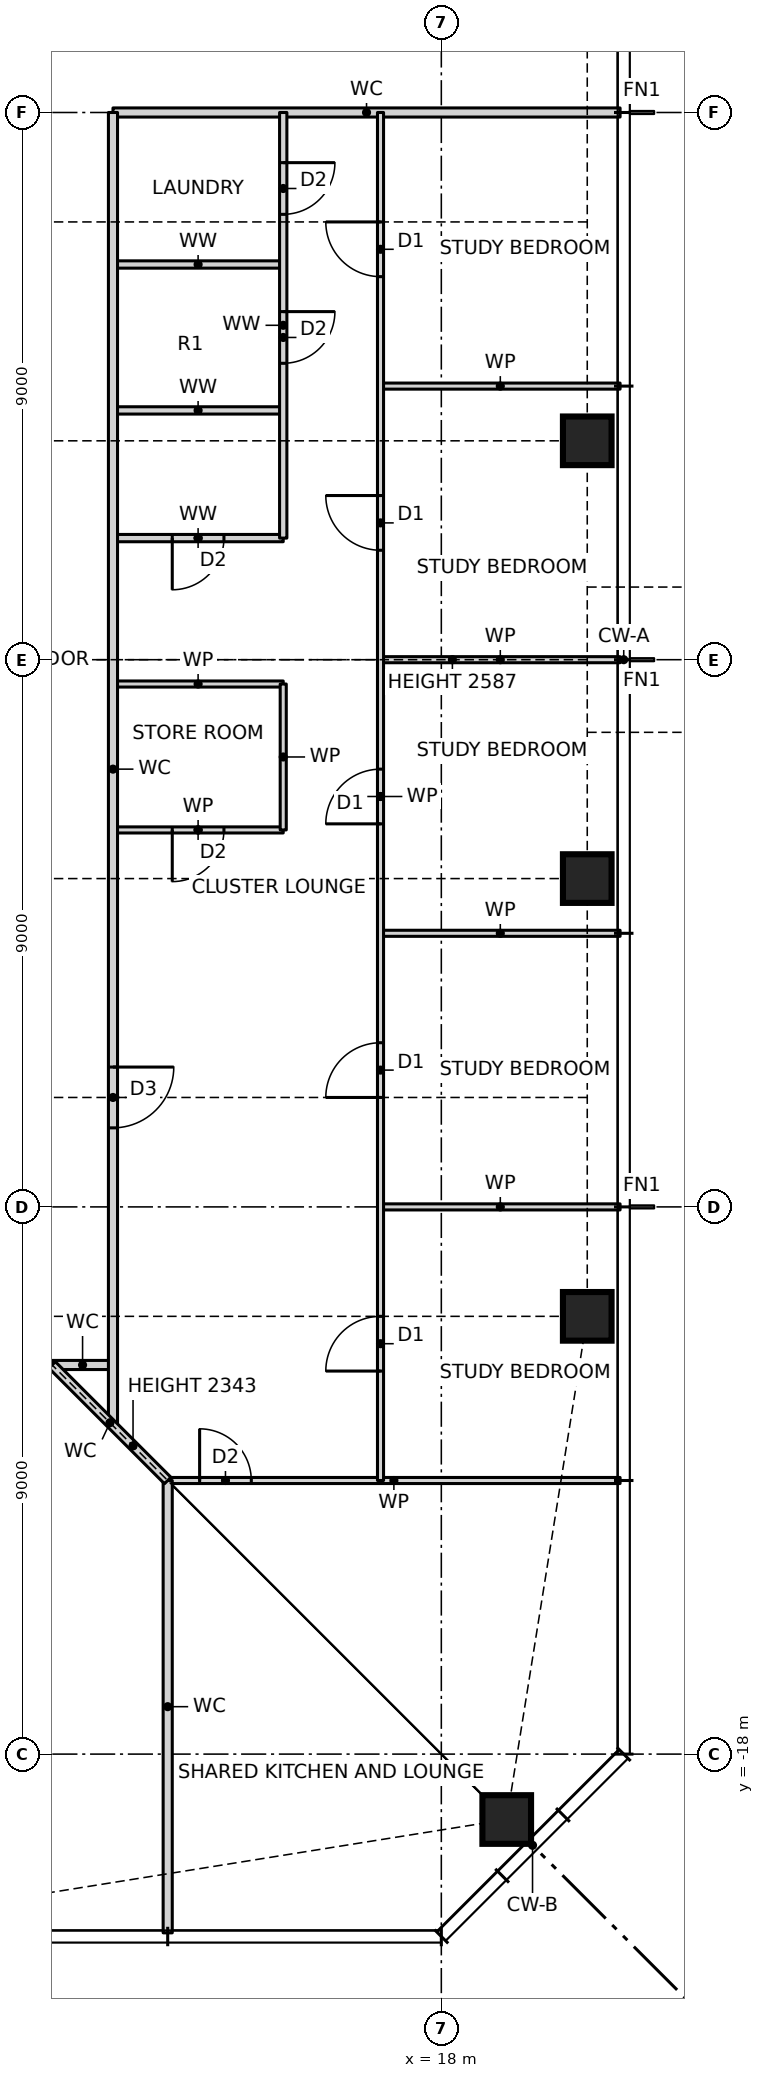
"""IFC4 building model, lengths in metres.
Left out: names, types, materials, properties, quantities, classifications, styles, units other than length and angle.
Written with IfcOpenShell. Run it as: python <this file> out.ifc"""

import sys

from ifc_helpers import new_model, si_unit, direction, frame, frame_2d, origin, origin_2d, place, context, subcontext, project, spatial, rectangle, hollow_rectangle, extrude, element, fill, save


model = new_model("IFC4")
c1 = context("Model", 3, precision=1e-05, world=origin(), true_north=direction((0.0, 1.0)))
c2 = subcontext(c1, "Body", "Model", "MODEL_VIEW")
j1 = project(units=[si_unit("LENGTHUNIT", "METRE"), si_unit("PLANEANGLEUNIT", "RADIAN")], contexts=[c1])
p1 = place(None, origin())
s1 = spatial("IfcSite", under=j1, at=p1, CompositionType="ELEMENT")
p2 = place(p1, origin())
s2 = spatial("IfcBuilding", under=s1, at=p2, CompositionType="ELEMENT")
p3 = place(p2, frame((0.0, 0.0, 94.5)))
s3 = spatial("IfcBuildingStorey", under=s2, at=p3, CompositionType="ELEMENT", Elevation=94.5)
for number, where, z_axis, x_axis in (
    (1, (19.076, -19.076, 0.0), (0.0, 0.0, 1.0), (1.0, 0.0, 0.0)),
    (2, (20.4, -10.8, 0.0), (0.0, 0.0, 1.0), (1.0, 0.0, 0.0)),
    (3, (20.4, -3.6, 0.0), (0.0, 0.0, 1.0), (1.0, 0.0, 0.0)),
    (4, (20.4, 3.6, 0.0), (0.0, 0.0, 1.0), (1.0, 0.0, 0.0)),
):
    element("IfcColumn", number, at=place(p3, frame(where, z_axis=z_axis, x_axis=x_axis)), inside=s3, PredefinedType="COLUMN", context=c2, shape_type="SweptSolid", body=[
        extrude(hollow_rectangle(XDim=0.8, YDim=0.8, WallThickness=0.07, at=origin_2d()), origin(), (0.0, 0.0, 1.0), 3.5),
    ])
p4 = place(p3, frame((13.5, -13.5, 0.0), z_axis=(0.0, 0.0, 1.0), x_axis=(1.0, 0.0, 0.0)))
e5 = element("IfcWall", 5, at=p4, inside=s3, PredefinedType="PARTITIONING", context=c2, shape_type="SweptSolid", body=[
    extrude(rectangle(XDim=7.44, YDim=0.1, at=frame_2d((3.72, 0.0))), origin(), (0.0, 0.0, 1.0), 3.27),
])
p5 = place(p4, frame((0.525, 0.0, 0.0)))
e6 = element("IfcOpeningElement", 6, at=p5, cuts=e5, PredefinedType="OPENING", context=c2, shape_type="SweptSolid", body=[
    extrude(rectangle(XDim=0.85, YDim=2.1, at=frame_2d((0.425, 1.05))), frame((0.0, 0.06, 0.0), z_axis=(0.0, -1.0, 0.0), x_axis=(1.0, 0.0, 0.0)), (0.0, 0.0, 1.0), 0.12),
])
p6 = place(p3, frame((11.6, -11.6, 0.0), z_axis=(0.0, 0.0, 1.0), x_axis=(1.0, 0.0, 0.0)))
e7 = element("IfcWall", 7, at=p6, inside=s3, PredefinedType="PARTITIONING", context=c2, shape_type="SweptSolid", body=[
    extrude(rectangle(XDim=1.0, YDim=0.15, at=frame_2d((0.5, 0.0))), origin(), (0.0, 0.0, 1.0), 3.27),
])
for number, where, z_axis, x_axis in (
    (8, (17.0, -9.0, 0.0), (0.0, 0.0, 1.0), (1.0, 0.0, 0.0)),
    (9, (17.0, -4.5, 0.0), (0.0, 0.0, 1.0), (1.0, 0.0, 0.0)),
):
    element("IfcWall", number, at=place(p3, frame(where, z_axis=z_axis, x_axis=x_axis)), inside=s3, PredefinedType="PARTITIONING", context=c2, shape_type="SweptSolid", body=[
        extrude(rectangle(XDim=3.94, YDim=0.1, at=frame_2d((1.97, 0.0))), origin(), (0.0, 0.0, 1.0), 3.27),
    ])
p7 = place(p3, frame((12.6, -2.8, 0.0), z_axis=(0.0, 0.0, 1.0), x_axis=(1.0, 0.0, 0.0)))
e10 = element("IfcWall", 10, at=p7, inside=s3, PredefinedType="PARTITIONING", context=c2, shape_type="SweptSolid", body=[
    extrude(rectangle(XDim=2.8, YDim=0.1, at=frame_2d((1.4, 0.0))), origin(), (0.0, 0.0, 1.0), 3.27),
])
p8 = place(p7, frame((0.975, 0.0, 0.0)))
e11 = element("IfcOpeningElement", 11, at=p8, cuts=e10, PredefinedType="OPENING", context=c2, shape_type="SweptSolid", body=[
    extrude(rectangle(XDim=0.85, YDim=2.1, at=frame_2d((0.425, 1.05))), frame((0.0, 0.06, 0.0), z_axis=(0.0, -1.0, 0.0), x_axis=(1.0, 0.0, 0.0)), (0.0, 0.0, 1.0), 0.12),
])
p9 = place(p3, frame((12.6, -0.4, 0.0), z_axis=(0.0, 0.0, 1.0), x_axis=(1.0, 0.0, 0.0)))
e12 = element("IfcWall", 12, at=p9, inside=s3, PredefinedType="PARTITIONING", context=c2, shape_type="SweptSolid", body=[
    extrude(rectangle(XDim=2.8, YDim=0.1, at=frame_2d((1.4, 0.0))), origin(), (0.0, 0.0, 1.0), 3.27),
])
p10 = place(p3, frame((17.0, 0.0, 0.0), z_axis=(0.0, 0.0, 1.0), x_axis=(1.0, 0.0, 0.0)))
e13 = element("IfcWall", 13, at=p10, inside=s3, PredefinedType="PARTITIONING", context=c2, shape_type="SweptSolid", body=[
    extrude(rectangle(XDim=3.94, YDim=0.1, at=frame_2d((1.97, 0.0))), origin(), (0.0, 0.0, 1.0), 2.587),
])
p11 = place(p3, frame((12.6, 2.0, 0.0), z_axis=(0.0, 0.0, 1.0), x_axis=(1.0, 0.0, 0.0)))
e14 = element("IfcWall", 14, at=p11, inside=s3, PredefinedType="PARTITIONING", context=c2, shape_type="SweptSolid", body=[
    extrude(rectangle(XDim=2.8, YDim=0.12, at=frame_2d((1.4, 0.0))), origin(), (0.0, 0.0, 1.0), 3.27),
])
p12 = place(p11, frame((0.975, 0.0, 0.0)))
e15 = element("IfcOpeningElement", 15, at=p12, cuts=e14, PredefinedType="OPENING", context=c2, shape_type="SweptSolid", body=[
    extrude(rectangle(XDim=0.85, YDim=2.1, at=frame_2d((0.425, 1.05))), frame((0.0, 0.07, 0.0), z_axis=(0.0, -1.0, 0.0), x_axis=(1.0, 0.0, 0.0)), (0.0, 0.0, 1.0), 0.14),
])
p13 = place(p3, frame((12.6, 4.1, 0.0), z_axis=(0.0, 0.0, 1.0), x_axis=(1.0, 0.0, 0.0)))
e16 = element("IfcWall", 16, at=p13, inside=s3, PredefinedType="PARTITIONING", context=c2, shape_type="SweptSolid", body=[
    extrude(rectangle(XDim=2.8, YDim=0.12, at=frame_2d((1.4, 0.0))), origin(), (0.0, 0.0, 1.0), 3.27),
])
p14 = place(p3, frame((17.0, 4.5, 0.0), z_axis=(0.0, 0.0, 1.0), x_axis=(1.0, 0.0, 0.0)))
e17 = element("IfcWall", 17, at=p14, inside=s3, PredefinedType="PARTITIONING", context=c2, shape_type="SweptSolid", body=[
    extrude(rectangle(XDim=3.94, YDim=0.1, at=frame_2d((1.97, 0.0))), origin(), (0.0, 0.0, 1.0), 3.27),
])
p15 = place(p3, frame((12.6, 6.5, 0.0), z_axis=(0.0, 0.0, 1.0), x_axis=(1.0, 0.0, 0.0)))
e18 = element("IfcWall", 18, at=p15, inside=s3, PredefinedType="PARTITIONING", context=c2, shape_type="SweptSolid", body=[
    extrude(rectangle(XDim=2.8, YDim=0.12, at=frame_2d((1.4, 0.0))), origin(), (0.0, 0.0, 1.0), 3.27),
])
p16 = place(p3, frame((12.6, 9.0, 0.0), z_axis=(0.0, 0.0, 1.0), x_axis=(1.0, 0.0, 0.0)))
e19 = element("IfcWall", 19, at=p16, inside=s3, PredefinedType="PARTITIONING", context=c2, shape_type="SweptSolid", body=[
    extrude(rectangle(XDim=8.34, YDim=0.15, at=frame_2d((4.17, 0.0))), origin(), (0.0, 0.0, 1.0), 3.27),
])
p17 = place(p3, frame((17.0, -13.5, 0.0), z_axis=(0.0, 0.0, 1.0), x_axis=(0.0, 1.0, 0.0)))
e20 = element("IfcWall", 20, at=p17, inside=s3, PredefinedType="PARTITIONING", context=c2, shape_type="SweptSolid", body=[
    extrude(rectangle(XDim=22.5, YDim=0.1, at=frame_2d((11.25, 0.0))), origin(), (0.0, 0.0, 1.0), 3.27),
])
p18 = place(p17, frame((1.8, 0.0, 0.0)))
e21 = element("IfcOpeningElement", 21, at=p18, cuts=e20, PredefinedType="OPENING", context=c2, shape_type="SweptSolid", body=[
    extrude(rectangle(XDim=0.9, YDim=2.1, at=frame_2d((0.45, 1.05))), frame((0.0, 0.06, 0.0), z_axis=(0.0, -1.0, 0.0), x_axis=(1.0, 0.0, 0.0)), (0.0, 0.0, 1.0), 0.12),
])
p19 = place(p17, frame((6.3, 0.0, 0.0)))
e22 = element("IfcOpeningElement", 22, at=p19, cuts=e20, PredefinedType="OPENING", context=c2, shape_type="SweptSolid", body=[
    extrude(rectangle(XDim=0.9, YDim=2.1, at=frame_2d((0.45, 1.05))), frame((0.0, 0.06, 0.0), z_axis=(0.0, -1.0, 0.0), x_axis=(1.0, 0.0, 0.0)), (0.0, 0.0, 1.0), 0.12),
])
p20 = place(p17, frame((10.8, 0.0, 0.0)))
e23 = element("IfcOpeningElement", 23, at=p20, cuts=e20, PredefinedType="OPENING", context=c2, shape_type="SweptSolid", body=[
    extrude(rectangle(XDim=0.9, YDim=2.1, at=frame_2d((0.45, 1.05))), frame((0.0, 0.06, 0.0), z_axis=(0.0, -1.0, 0.0), x_axis=(1.0, 0.0, 0.0)), (0.0, 0.0, 1.0), 0.12),
])
p21 = place(p17, frame((15.3, 0.0, 0.0)))
e24 = element("IfcOpeningElement", 24, at=p21, cuts=e20, PredefinedType="OPENING", context=c2, shape_type="SweptSolid", body=[
    extrude(rectangle(XDim=0.9, YDim=2.1, at=frame_2d((0.45, 1.05))), frame((0.0, 0.06, 0.0), z_axis=(0.0, -1.0, 0.0), x_axis=(1.0, 0.0, 0.0)), (0.0, 0.0, 1.0), 0.12),
])
p22 = place(p17, frame((19.8, 0.0, 0.0)))
e25 = element("IfcOpeningElement", 25, at=p22, cuts=e20, PredefinedType="OPENING", context=c2, shape_type="SweptSolid", body=[
    extrude(rectangle(XDim=0.9, YDim=2.1, at=frame_2d((0.45, 1.05))), frame((0.0, 0.06, 0.0), z_axis=(0.0, -1.0, 0.0), x_axis=(1.0, 0.0, 0.0)), (0.0, 0.0, 1.0), 0.12),
])
p23 = place(p3, frame((15.4, -2.8, 0.0), z_axis=(0.0, 0.0, 1.0), x_axis=(0.0, 1.0, 0.0)))
e26 = element("IfcWall", 26, at=p23, inside=s3, PredefinedType="PARTITIONING", context=c2, shape_type="SweptSolid", body=[
    extrude(rectangle(XDim=2.4, YDim=0.1, at=frame_2d((1.2, 0.0))), origin(), (0.0, 0.0, 1.0), 3.27),
])
p24 = place(p3, frame((15.4, 2.0, 0.0), z_axis=(0.0, 0.0, 1.0), x_axis=(0.0, 1.0, 0.0)))
e27 = element("IfcWall", 27, at=p24, inside=s3, PredefinedType="PARTITIONING", context=c2, shape_type="SweptSolid", body=[
    extrude(rectangle(XDim=7.0, YDim=0.12, at=frame_2d((3.5, 0.0))), origin(), (0.0, 0.0, 1.0), 3.27),
])
p25 = place(p24, frame((2.875, 0.0, 0.0)))
e28 = element("IfcOpeningElement", 28, at=p25, cuts=e27, PredefinedType="OPENING", context=c2, shape_type="SweptSolid", body=[
    extrude(rectangle(XDim=0.85, YDim=2.1, at=frame_2d((0.425, 1.05))), frame((0.0, 0.07, 0.0), z_axis=(0.0, -1.0, 0.0), x_axis=(1.0, 0.0, 0.0)), (0.0, 0.0, 1.0), 0.14),
])
p26 = place(p24, frame((5.325, 0.0, 0.0)))
e29 = element("IfcOpeningElement", 29, at=p26, cuts=e27, PredefinedType="OPENING", context=c2, shape_type="SweptSolid", body=[
    extrude(rectangle(XDim=0.85, YDim=2.1, at=frame_2d((0.425, 1.05))), frame((0.0, 0.07, 0.0), z_axis=(0.0, -1.0, 0.0), x_axis=(1.0, 0.0, 0.0)), (0.0, 0.0, 1.0), 0.14),
])
p27 = place(p3, frame((13.5, -20.94, 0.0), z_axis=(0.0, 0.0, 1.0), x_axis=(0.0, 1.0, 0.0)))
e30 = element("IfcWall", 30, at=p27, inside=s3, PredefinedType="PARTITIONING", context=c2, shape_type="SweptSolid", body=[
    extrude(rectangle(XDim=7.44, YDim=0.15, at=frame_2d((3.72, 0.0))), origin(), (0.0, 0.0, 1.0), 3.27),
])
p28 = place(p3, frame((12.6, -12.6, 0.0), z_axis=(0.0, 0.0, 1.0), x_axis=(0.0, 1.0, 0.0)))
e31 = element("IfcWall", 31, at=p28, inside=s3, PredefinedType="PARTITIONING", context=c2, shape_type="SweptSolid", body=[
    extrude(rectangle(XDim=21.6, YDim=0.15, at=frame_2d((10.8, 0.0))), origin(), (0.0, 0.0, 1.0), 3.27),
])
p29 = place(p28, frame((4.9, 0.0, 0.0)))
e32 = element("IfcOpeningElement", 32, at=p29, cuts=e31, PredefinedType="OPENING", context=c2, shape_type="SweptSolid", body=[
    extrude(rectangle(XDim=1.0, YDim=2.1, at=frame_2d((0.5, 1.05))), frame((0.0, 0.085, 0.0), z_axis=(0.0, -1.0, 0.0), x_axis=(1.0, 0.0, 0.0)), (0.0, 0.0, 1.0), 0.17),
])
p30 = place(p3, frame((13.5, -13.5, 0.0), z_axis=(0.0, 0.0, 1.0), x_axis=(-0.707106781187, 0.707106781187, 0.0)))
e33 = element("IfcWall", 33, at=p30, inside=s3, PredefinedType="PARTITIONING", context=c2, shape_type="SweptSolid", body=[
    extrude(rectangle(XDim=2.687, YDim=0.15, at=frame_2d((1.343, 0.0))), origin(), (0.0, 0.0, 1.0), 2.343),
])
p31 = place(p18, origin())
e34 = element("IfcDoor", 34, at=p31, inside=s3, OperationType="SINGLE_SWING_LEFT", PredefinedType="DOOR", context=c2, shape_type="SweptSolid", body=[
    extrude(rectangle(XDim=0.9, YDim=2.1, at=frame_2d((0.45, 1.05))), frame((0.0, 0.025, 0.0), z_axis=(0.0, -1.0, 0.0), x_axis=(1.0, 0.0, 0.0)), (0.0, 0.0, 1.0), 0.05),
])
fill(e21, e34)
p32 = place(p19, origin())
e35 = element("IfcDoor", 35, at=p32, inside=s3, OperationType="SINGLE_SWING_LEFT", PredefinedType="DOOR", context=c2, shape_type="SweptSolid", body=[
    extrude(rectangle(XDim=0.9, YDim=2.1, at=frame_2d((0.45, 1.05))), frame((0.0, 0.025, 0.0), z_axis=(0.0, -1.0, 0.0), x_axis=(1.0, 0.0, 0.0)), (0.0, 0.0, 1.0), 0.05),
])
fill(e22, e35)
p33 = place(p20, origin())
e36 = element("IfcDoor", 36, at=p33, inside=s3, OperationType="SINGLE_SWING_LEFT", PredefinedType="DOOR", context=c2, shape_type="SweptSolid", body=[
    extrude(rectangle(XDim=0.9, YDim=2.1, at=frame_2d((0.45, 1.05))), frame((0.0, 0.025, 0.0), z_axis=(0.0, -1.0, 0.0), x_axis=(1.0, 0.0, 0.0)), (0.0, 0.0, 1.0), 0.05),
])
fill(e23, e36)
p34 = place(p21, origin())
e37 = element("IfcDoor", 37, at=p34, inside=s3, OperationType="SINGLE_SWING_RIGHT", PredefinedType="DOOR", context=c2, shape_type="SweptSolid", body=[
    extrude(rectangle(XDim=0.9, YDim=2.1, at=frame_2d((0.45, 1.05))), frame((0.0, 0.025, 0.0), z_axis=(0.0, -1.0, 0.0), x_axis=(1.0, 0.0, 0.0)), (0.0, 0.0, 1.0), 0.05),
])
fill(e24, e37)
p35 = place(p22, origin())
e38 = element("IfcDoor", 38, at=p35, inside=s3, OperationType="SINGLE_SWING_RIGHT", PredefinedType="DOOR", context=c2, shape_type="SweptSolid", body=[
    extrude(rectangle(XDim=0.9, YDim=2.1, at=frame_2d((0.45, 1.05))), frame((0.0, 0.025, 0.0), z_axis=(0.0, -1.0, 0.0), x_axis=(1.0, 0.0, 0.0)), (0.0, 0.0, 1.0), 0.05),
])
fill(e25, e38)
p36 = place(p29, frame((1.0, 0.0, 0.0), z_axis=(0.0, 0.0, 1.0), x_axis=(-1.0, 0.0, 0.0)))
e39 = element("IfcDoor", 39, at=p36, inside=s3, OperationType="SINGLE_SWING_LEFT", PredefinedType="DOOR", context=c2, shape_type="SweptSolid", body=[
    extrude(rectangle(XDim=1.0, YDim=2.1, at=frame_2d((0.5, 1.05))), frame((0.0, 0.025, 0.0), z_axis=(0.0, -1.0, 0.0), x_axis=(1.0, 0.0, 0.0)), (0.0, 0.0, 1.0), 0.05),
])
fill(e32, e39)
p37 = place(p8, frame((0.85, 0.0, 0.0), z_axis=(0.0, 0.0, 1.0), x_axis=(-1.0, 0.0, 0.0)))
e40 = element("IfcDoor", 40, at=p37, inside=s3, OperationType="SINGLE_SWING_RIGHT", PredefinedType="DOOR", context=c2, shape_type="SweptSolid", body=[
    extrude(rectangle(XDim=0.85, YDim=2.1, at=frame_2d((0.425, 1.05))), frame((0.0, 0.025, 0.0), z_axis=(0.0, -1.0, 0.0), x_axis=(1.0, 0.0, 0.0)), (0.0, 0.0, 1.0), 0.05),
])
fill(e11, e40)
p38 = place(p12, frame((0.85, 0.0, 0.0), z_axis=(0.0, 0.0, 1.0), x_axis=(-1.0, 0.0, 0.0)))
e41 = element("IfcDoor", 41, at=p38, inside=s3, OperationType="SINGLE_SWING_RIGHT", PredefinedType="DOOR", context=c2, shape_type="SweptSolid", body=[
    extrude(rectangle(XDim=0.85, YDim=2.1, at=frame_2d((0.425, 1.05))), frame((0.0, 0.025, 0.0), z_axis=(0.0, -1.0, 0.0), x_axis=(1.0, 0.0, 0.0)), (0.0, 0.0, 1.0), 0.05),
])
fill(e15, e41)
p39 = place(p25, frame((0.85, 0.0, 0.0), z_axis=(0.0, 0.0, 1.0), x_axis=(-1.0, 0.0, 0.0)))
e42 = element("IfcDoor", 42, at=p39, inside=s3, OperationType="SINGLE_SWING_LEFT", PredefinedType="DOOR", context=c2, shape_type="SweptSolid", body=[
    extrude(rectangle(XDim=0.85, YDim=2.1, at=frame_2d((0.425, 1.05))), frame((0.0, 0.025, 0.0), z_axis=(0.0, -1.0, 0.0), x_axis=(1.0, 0.0, 0.0)), (0.0, 0.0, 1.0), 0.05),
])
fill(e28, e42)
p40 = place(p26, frame((0.85, 0.0, 0.0), z_axis=(0.0, 0.0, 1.0), x_axis=(-1.0, 0.0, 0.0)))
e43 = element("IfcDoor", 43, at=p40, inside=s3, OperationType="SINGLE_SWING_LEFT", PredefinedType="DOOR", context=c2, shape_type="SweptSolid", body=[
    extrude(rectangle(XDim=0.85, YDim=2.1, at=frame_2d((0.425, 1.05))), frame((0.0, 0.025, 0.0), z_axis=(0.0, -1.0, 0.0), x_axis=(1.0, 0.0, 0.0)), (0.0, 0.0, 1.0), 0.05),
])
fill(e29, e43)
p41 = place(p5, origin())
e44 = element("IfcDoor", 44, at=p41, inside=s3, OperationType="SINGLE_SWING_LEFT", PredefinedType="DOOR", context=c2, shape_type="SweptSolid", body=[
    extrude(rectangle(XDim=0.85, YDim=2.1, at=frame_2d((0.425, 1.05))), frame((0.0, 0.025, 0.0), z_axis=(0.0, -1.0, 0.0), x_axis=(1.0, 0.0, 0.0)), (0.0, 0.0, 1.0), 0.05),
])
fill(e6, e44)
save(model, sys.argv[1])
